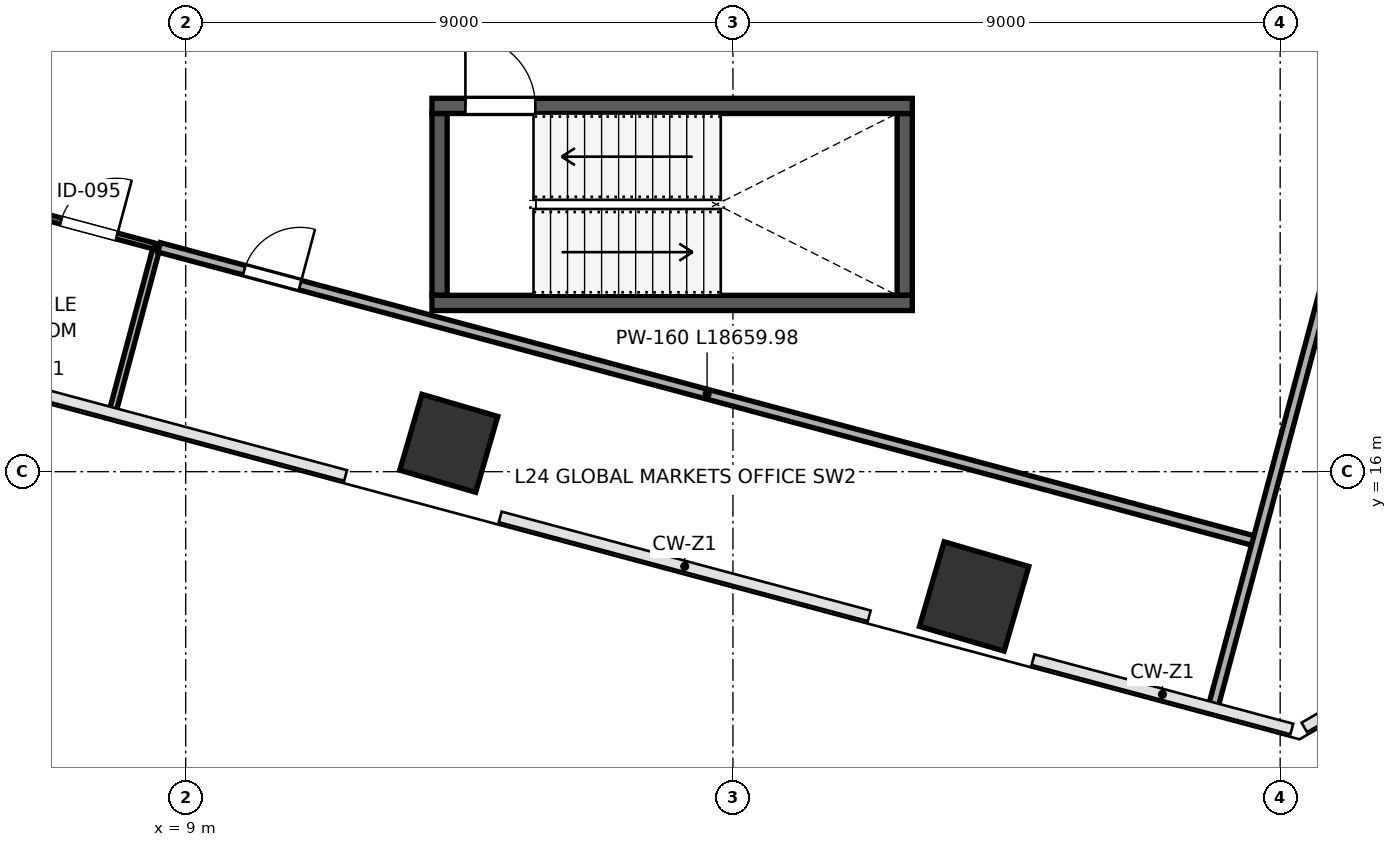
"""IFC4 building model, lengths in metres.
Left out: names, types, materials, properties, quantities, classifications, styles, units other than length and angle.
Written with IfcOpenShell. Run it as: python <this file> out.ifc"""

import sys

from ifc_helpers import new_model, si_unit, direction, frame, frame_2d, origin, origin_2d, place, context, subcontext, project, spatial, rectangle, extrude, clip, halfspace, source, transform, mapped, element, fill, save


model = new_model("IFC4")
c1 = context("Model", 3, precision=1e-05, world=origin(), true_north=direction((0.0, 1.0)))
c2 = subcontext(c1, "Body", "Model", "MODEL_VIEW")
j1 = project(units=[si_unit("LENGTHUNIT", "METRE"), si_unit("PLANEANGLEUNIT", "RADIAN")], contexts=[c1])
p1 = place(None, origin())
s1 = spatial("IfcSite", under=j1, at=p1, CompositionType="ELEMENT")
p2 = place(p1, origin())
s2 = spatial("IfcBuilding", under=s1, at=p2, CompositionType="ELEMENT")
p3 = place(p2, frame((0.0, 0.0, 108.4)))
s3 = spatial("IfcBuildingStorey", under=s2, at=p3, CompositionType="ELEMENT", Elevation=108.4)
p4 = place(p3, frame((13.327, 16.467, 0.0), z_axis=(-0.079882697855, 0.043125079639, 0.995870966586), x_axis=(0.701293103519, 0.712420294494, 0.025402892552)))
e1 = element("IfcColumn", 1, at=p4, inside=s3, PredefinedType="COLUMN", context=c2, shape_type="Clipping", body=[
    clip(clip(extrude(rectangle(XDim=1.3, YDim=1.3, at=origin_2d()), origin(), (0.0, 0.0, 1.0), 4.218), halfspace(frame((0.0, 0.0, 0.074), z_axis=(0.0, 0.0, -1.0), x_axis=(1.0, 0.0, 0.0)), False)), halfspace(frame((0.0, 0.0, 4.143), z_axis=(0.0, 0.0, 1.0), x_axis=(1.0, 0.0, 0.0)), False)),
])
p5 = place(p3, frame((21.967, 13.948, 0.0), z_axis=(-0.093405157056, -0.001388924268, 0.99562721313), x_axis=(0.264300328545, 0.964086104961, 0.02614036252)))
e2 = element("IfcColumn", 2, at=p5, inside=s3, PredefinedType="COLUMN", context=c2, shape_type="Clipping", body=[
    clip(clip(extrude(rectangle(XDim=1.45, YDim=1.45, at=origin_2d()), origin(), (0.0, 0.0, 1.0), 4.219), halfspace(frame((0.0, 0.0, 0.085), z_axis=(0.0, 0.0, -1.0), x_axis=(1.0, 0.0, 0.0)), False)), halfspace(frame((0.0, 0.0, 4.134), z_axis=(0.0, 0.0, 1.0), x_axis=(1.0, 0.0, 0.0)), False)),
])
for number, where, z_axis, x_axis in (
    (3, (13.175, 18.9, 0.0), (0.0, 0.0, 1.0), (0.0, 1.0, 0.0)),
    (4, (20.825, 18.9, 0.0), (0.0, 0.0, 1.0), (0.0, 1.0, 0.0)),
):
    element("IfcWall", number, at=place(p3, frame(where, z_axis=z_axis, x_axis=x_axis)), inside=s3, PredefinedType="SHEAR", context=c2, shape_type="SweptSolid", body=[
        extrude(rectangle(XDim=2.99, YDim=0.25, at=frame_2d((1.495, 0.0))), origin(), (0.0, 0.0, 1.0), 3.96),
    ])
p6 = place(p3, frame((13.05, 18.775, 0.0), z_axis=(0.0, 0.0, 1.0), x_axis=(1.0, 0.0, 0.0)))
e5 = element("IfcWall", 5, at=p6, inside=s3, PredefinedType="SHEAR", context=c2, shape_type="SweptSolid", body=[
    extrude(rectangle(XDim=7.9, YDim=0.25, at=frame_2d((3.95, 0.0))), origin(), (0.0, 0.0, 1.0), 3.96),
])
p7 = place(p3, frame((13.05, 22.015, 0.0), z_axis=(0.0, 0.0, 1.0), x_axis=(1.0, 0.0, 0.0)))
e6 = element("IfcWall", 6, at=p7, inside=s3, PredefinedType="SHEAR", context=c2, shape_type="SweptSolid", body=[
    extrude(rectangle(XDim=7.9, YDim=0.25, at=frame_2d((3.95, 0.0))), origin(), (0.0, 0.0, 1.0), 3.96),
])
p8 = place(p7, frame((0.55, 0.0, 0.0)))
e7 = element("IfcOpeningElement", 7, at=p8, cuts=e6, PredefinedType="OPENING", context=c2, shape_type="SweptSolid", body=[
    extrude(rectangle(XDim=1.15, YDim=2.2, at=frame_2d((0.575, 1.1))), frame((0.0, 0.135, 0.0), z_axis=(0.0, -1.0, 0.0), x_axis=(1.0, 0.0, 0.0)), (0.0, 0.0, 1.0), 0.27),
])
p9 = place(p3, frame((7.805, 17.014, 0.0), z_axis=(0.0, 0.0, 1.0), x_axis=(0.258832579125, 0.965922199757, 0.0)))
e8 = element("IfcWall", 8, at=p9, inside=s3, PredefinedType="PARTITIONING", context=c2, shape_type="SweptSolid", body=[
    extrude(rectangle(XDim=2.74, YDim=0.115, at=frame_2d((1.37, 0.0))), origin(), (0.0, 0.0, 1.0), 3.095),
])
p10 = place(p3, frame((1.318, 21.63, 0.0), z_axis=(0.0, 0.0, 1.0), x_axis=(0.965935568552, -0.258782683744, 0.0)))
e9 = element("IfcWall", 9, at=p10, inside=s3, PredefinedType="PARTITIONING", context=c2, shape_type="SweptSolid", body=[
    extrude(rectangle(XDim=7.42, YDim=0.1, at=frame_2d((3.71, 0.0))), origin(), (0.0, 0.0, 1.0), 3.96),
])
p11 = place(p10, frame((0.8, 0.0, 0.0)))
e10 = element("IfcOpeningElement", 10, at=p11, cuts=e9, PredefinedType="OPENING", context=c2, shape_type="SweptSolid", body=[
    extrude(rectangle(XDim=0.9, YDim=2.15, at=frame_2d((0.45, 1.075))), frame((0.0, 0.06, 0.0), z_axis=(0.0, -1.0, 0.0), x_axis=(1.0, 0.0, 0.0)), (0.0, 0.0, 1.0), 0.12),
])
p12 = place(p10, frame((5.83, 0.0, 0.0)))
e11 = element("IfcOpeningElement", 11, at=p12, cuts=e9, PredefinedType="OPENING", context=c2, shape_type="SweptSolid", body=[
    extrude(rectangle(XDim=0.95, YDim=2.15, at=frame_2d((0.475, 1.075))), frame((0.0, 0.06, 0.0), z_axis=(0.0, -1.0, 0.0), x_axis=(1.0, 0.0, 0.0)), (0.0, 0.0, 1.0), 0.12),
])
p13 = place(p3, frame((8.563, 19.689, 0.0), z_axis=(0.0, 0.0, 1.0), x_axis=(0.965928721089, -0.258808241319, 0.0)))
e12 = element("IfcWall", 12, at=p13, inside=s3, PredefinedType="PARTITIONING", context=c2, shape_type="SweptSolid", body=[
    extrude(rectangle(XDim=18.66, YDim=0.16, at=frame_2d((9.33, 0.0))), origin(), (0.0, 0.0, 1.0), 3.96),
])
p14 = place(p13, frame((1.45, 0.0, 0.0)))
e13 = element("IfcOpeningElement", 13, at=p14, cuts=e12, PredefinedType="OPENING", context=c2, shape_type="SweptSolid", body=[
    extrude(rectangle(XDim=0.95, YDim=2.15, at=frame_2d((0.475, 1.075))), frame((0.0, 0.09, 0.0), z_axis=(0.0, -1.0, 0.0), x_axis=(1.0, 0.0, 0.0)), (0.0, 0.0, 1.0), 0.18),
])
p15 = place(p3, frame((25.906, 12.164, 0.0), z_axis=(0.0, 0.0, 1.0), x_axis=(0.258805595447, 0.965929430013, 0.0)))
e14 = element("IfcWall", 14, at=p15, inside=s3, PredefinedType="PARTITIONING", context=c2, shape_type="SweptSolid", body=[
    extrude(rectangle(XDim=19.78, YDim=0.16, at=frame_2d((9.89, 0.0))), origin(), (0.0, 0.0, 1.0), 3.96),
])
m1 = source(origin(), c2, "Body", "SweptSolid", [
    extrude(rectangle(XDim=1.15, YDim=2.2, at=frame_2d((0.575, 1.1))), frame((0.0, 0.025, 0.0), z_axis=(0.0, -1.0, 0.0), x_axis=(1.0, 0.0, 0.0)), (0.0, 0.0, 1.0), 0.05),
])
p16 = place(p8, origin())
e15 = element("IfcDoor", 15, at=p16, inside=s3, OperationType="SINGLE_SWING_LEFT", PredefinedType="DOOR", context=c2, shape_type="MappedRepresentation", body=[
    mapped(m1, transform((0.0, 0.0, 0.0), scale=1.0)),
])
fill(e7, e15)
m2 = source(origin(), c2, "Body", "SweptSolid", [
    extrude(rectangle(XDim=0.95, YDim=2.15, at=frame_2d((0.475, 1.075))), frame((0.0, 0.025, 0.0), z_axis=(0.0, -1.0, 0.0), x_axis=(1.0, 0.0, 0.0)), (0.0, 0.0, 1.0), 0.05),
])
p17 = place(p12, origin())
e16 = element("IfcDoor", 16, at=p17, inside=s3, OperationType="SINGLE_SWING_RIGHT", PredefinedType="DOOR", context=c2, shape_type="MappedRepresentation", body=[
    mapped(m2, transform((0.0, 0.0, 0.0), scale=1.0)),
])
fill(e11, e16)
m3 = source(origin(), c2, "Body", "SweptSolid", [
    extrude(rectangle(XDim=0.95, YDim=2.15, at=frame_2d((0.475, 1.075))), frame((0.0, 0.025, 0.0), z_axis=(0.0, -1.0, 0.0), x_axis=(1.0, 0.0, 0.0)), (0.0, 0.0, 1.0), 0.05),
])
p18 = place(p14, origin())
e17 = element("IfcDoor", 17, at=p18, inside=s3, OperationType="SINGLE_SWING_RIGHT", PredefinedType="DOOR", context=c2, shape_type="MappedRepresentation", body=[
    mapped(m3, transform((0.0, 0.0, 0.0), scale=1.0)),
])
fill(e13, e17)
save(model, sys.argv[1])
